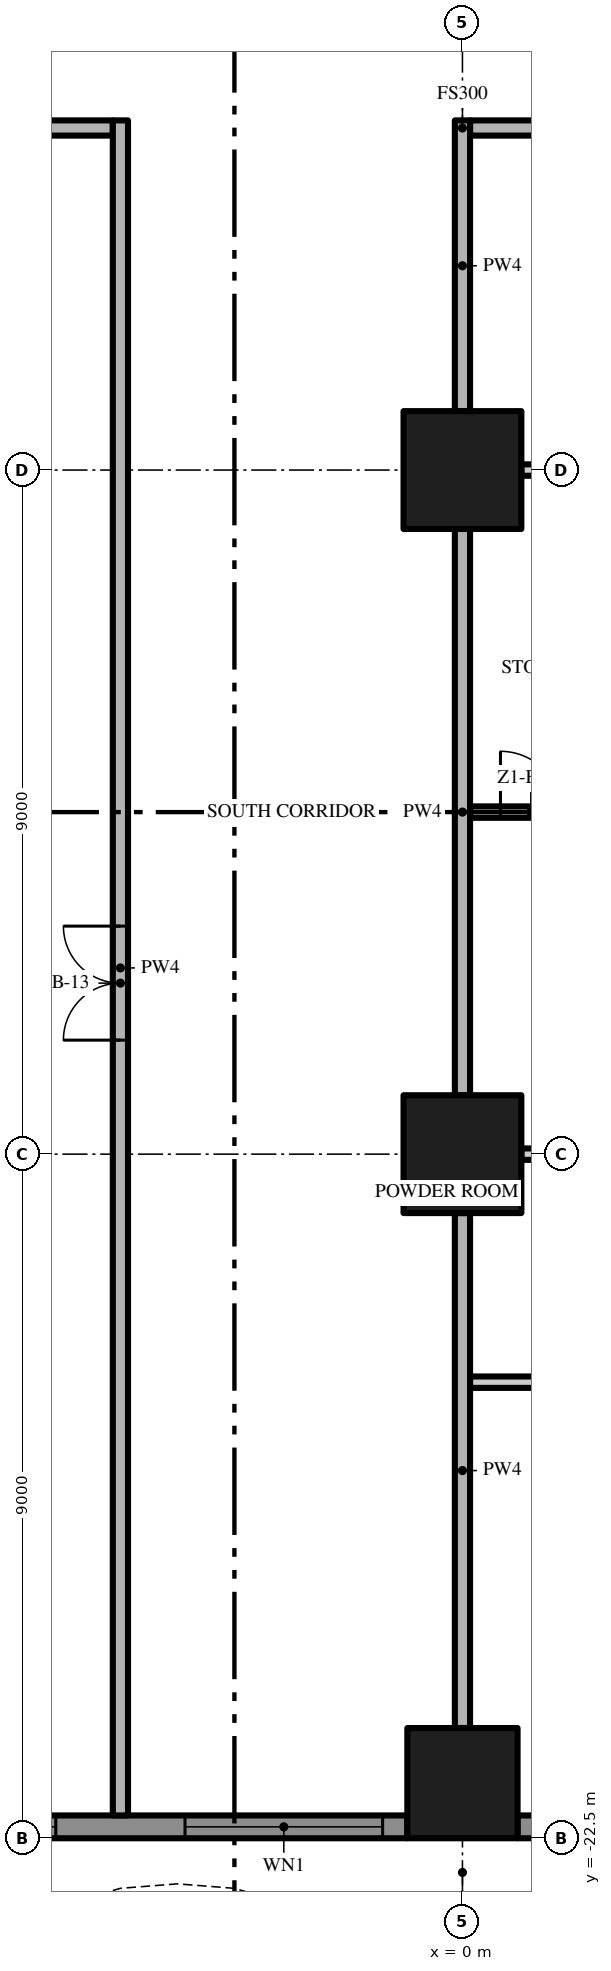
"""IFC4 building model, lengths in metres.
Left out: names, types, materials, properties, quantities, classifications, styles, units other than length and angle.
Written with IfcOpenShell. Run it as: python <this file> out.ifc"""

import sys

from ifc_helpers import new_model, si_unit, direction, frame, frame_2d, origin, origin_2d, place, context, subcontext, project, spatial, polyline, rectangle, outline, extrude, element, fill, save


model = new_model("IFC4")
c1 = context("Model", 3, precision=1e-05, world=origin(), true_north=direction((0.0, 1.0)))
c2 = subcontext(c1, "Body", "Model", "MODEL_VIEW")
j1 = project(units=[si_unit("LENGTHUNIT", "METRE"), si_unit("PLANEANGLEUNIT", "RADIAN")], contexts=[c1])
p1 = place(None, origin())
s1 = spatial("IfcSite", under=j1, at=p1, CompositionType="ELEMENT")
p2 = place(p1, origin())
s2 = spatial("IfcBuilding", under=s1, at=p2, CompositionType="ELEMENT")
p3 = place(p2, frame((0.0, 0.0, 30.2)))
s3 = spatial("IfcBuildingStorey", under=s2, at=p3, CompositionType="ELEMENT", Elevation=30.2)
p4 = place(p3, frame((0.0, -13.5, 0.0), z_axis=(0.0, 0.0, 1.0), x_axis=(1.0, 0.0, 0.0)))
e1 = element("IfcColumn", 1, at=p4, inside=s3, PredefinedType="COLUMN", context=c2, shape_type="SweptSolid", body=[
    extrude(rectangle(XDim=1.55, YDim=1.55, at=origin_2d()), origin(), (0.0, 0.0, 1.0), 3.5),
])
p5 = place(p3, frame((0.0, -21.775, 0.0), z_axis=(0.0, 0.0, 1.0), x_axis=(1.0, 0.0, 0.0)))
e2 = element("IfcColumn", 2, at=p5, inside=s3, PredefinedType="COLUMN", context=c2, shape_type="SweptSolid", body=[
    extrude(rectangle(XDim=1.45, YDim=1.45, at=origin_2d()), origin(), (0.0, 0.0, 1.0), 3.5),
])
p6 = place(p3, frame((0.0, -4.5, 0.0), z_axis=(0.0, 0.0, 1.0), x_axis=(1.0, 0.0, 0.0)))
e3 = element("IfcColumn", 3, at=p6, inside=s3, PredefinedType="COLUMN", context=c2, shape_type="SweptSolid", body=[
    extrude(rectangle(XDim=1.55, YDim=1.55, at=origin_2d()), origin(), (0.0, 0.0, 1.0), 3.5),
])
p7 = place(p3, frame((-0.725, -22.35, 0.0), z_axis=(0.0, 0.0, 1.0), x_axis=(-1.0, 0.0, 0.0)))
e4 = element("IfcWall", 4, at=p7, inside=s3, PredefinedType="SOLIDWALL", context=c2, shape_type="SweptSolid", body=[
    extrude(rectangle(XDim=7.55, YDim=0.3, at=frame_2d((3.775, 0.0))), origin(), (0.0, 0.0, 1.0), 3.5),
])
p8 = place(p7, frame((4.625, 0.0, 0.45)))
e5 = element("IfcOpeningElement", 5, at=p8, cuts=e4, PredefinedType="OPENING", context=c2, shape_type="SweptSolid", body=[
    extrude(rectangle(XDim=2.6, YDim=2.65, at=frame_2d((1.3, 1.325))), frame((0.0, 0.16, 0.0), z_axis=(0.0, -1.0, 0.0), x_axis=(1.0, 0.0, 0.0)), (0.0, 0.0, 1.0), 0.32),
])
p9 = place(p7, frame((0.325, 0.0, 0.45)))
e6 = element("IfcOpeningElement", 6, at=p9, cuts=e4, PredefinedType="OPENING", context=c2, shape_type="SweptSolid", body=[
    extrude(rectangle(XDim=2.6, YDim=2.65, at=frame_2d((1.3, 1.325))), frame((0.0, 0.16, 0.0), z_axis=(0.0, -1.0, 0.0), x_axis=(1.0, 0.0, 0.0)), (0.0, 0.0, 1.0), 0.32),
])
p10 = place(p3, frame((8.275, -22.35, 0.0), z_axis=(0.0, 0.0, 1.0), x_axis=(-1.0, 0.0, 0.0)))
e7 = element("IfcWall", 7, at=p10, inside=s3, PredefinedType="SOLIDWALL", context=c2, shape_type="SweptSolid", body=[
    extrude(rectangle(XDim=7.55, YDim=0.3, at=frame_2d((3.775, 0.0))), origin(), (0.0, 0.0, 1.0), 3.5),
])
p11 = place(p10, frame((4.625, 0.0, 0.0)))
e8 = element("IfcOpeningElement", 8, at=p11, cuts=e7, PredefinedType="OPENING", context=c2, shape_type="SweptSolid", body=[
    extrude(rectangle(XDim=2.6, YDim=2.4, at=frame_2d((1.3, 1.2))), frame((0.0, 0.16, 0.0), z_axis=(0.0, -1.0, 0.0), x_axis=(1.0, 0.0, 0.0)), (0.0, 0.0, 1.0), 0.32),
])
p12 = place(p10, frame((0.325, 0.0, 0.45)))
e9 = element("IfcOpeningElement", 9, at=p12, cuts=e7, PredefinedType="OPENING", context=c2, shape_type="SweptSolid", body=[
    extrude(rectangle(XDim=2.6, YDim=2.65, at=frame_2d((1.3, 1.325))), frame((0.0, 0.16, 0.0), z_axis=(0.0, -1.0, 0.0), x_axis=(1.0, 0.0, 0.0)), (0.0, 0.0, 1.0), 0.32),
])
p13 = place(p3, origin())
e10 = element("IfcWall", 10, at=p13, inside=s3, PredefinedType="USERDEFINED", context=c2, shape_type="SweptSolid", body=[
    extrude(outline(polyline([(-22.5, -24.3), (-21.0, -23.595), (-19.5, -23.159), (-18.75, -23.1), (-18.0, -23.159), (-16.5, -23.595), (-15.0, -24.3), (-13.5, -25.005), (-12.0, -25.441), (-11.25, -25.5), (-10.5, -25.441), (-9.0, -25.005), (-7.5, -24.3), (-6.0, -23.595), (-4.5, -23.159), (-3.75, -23.1), (-3.0, -23.159), (-1.5, -23.595), (0.0, -24.3), (1.5, -25.005), (3.0, -25.441), (3.75, -25.5), (4.5, -25.441), (6.0, -25.005), (7.5, -24.3), (9.0, -23.595), (10.5, -23.159), (11.25, -23.1), (12.0, -23.159), (13.5, -23.595), (15.0, -24.3), (16.5, -25.005), (18.0, -25.441), (18.75, -25.5), (19.5, -25.441), (21.0, -25.005), (22.5, -24.3), (22.394, -24.074), (20.911, -24.771), (19.455, -25.194), (18.75, -25.249), (18.045, -25.194), (16.589, -24.771), (15.106, -24.074), (13.589, -23.36), (12.045, -22.911), (11.25, -22.849), (10.455, -22.911), (8.911, -23.36), (7.394, -24.074), (5.911, -24.771), (4.455, -25.194), (3.75, -25.249), (3.045, -25.194), (1.589, -24.771), (0.106, -24.074), (-1.411, -23.36), (-2.955, -22.911), (-3.75, -22.849), (-4.545, -22.911), (-6.089, -23.36), (-7.606, -24.074), (-9.089, -24.771), (-10.545, -25.194), (-11.25, -25.249), (-11.955, -25.194), (-13.411, -24.771), (-14.894, -24.074), (-16.411, -23.36), (-17.955, -22.911), (-18.75, -22.849), (-19.545, -22.911), (-21.089, -23.36), (-22.606, -24.074), (-22.5, -24.3)])), origin(), (0.0, 0.0, 1.0), 0.9),
])
p14 = place(p3, frame((0.1, -16.5, 0.0), z_axis=(0.0, 0.0, 1.0), x_axis=(1.0, 0.0, 0.0)))
e11 = element("IfcWall", 11, at=p14, inside=s3, PredefinedType="PARTITIONING", context=c2, shape_type="SweptSolid", body=[
    extrude(rectangle(XDim=2.075, YDim=0.15, at=frame_2d((1.038, 0.0))), origin(), (0.0, 0.0, 1.0), 3.5),
])
p15 = place(p3, frame((8.225, -13.5, 0.0), z_axis=(0.0, 0.0, 1.0), x_axis=(-1.0, 0.0, 0.0)))
e12 = element("IfcWall", 12, at=p15, inside=s3, PredefinedType="PARTITIONING", context=c2, shape_type="SweptSolid", body=[
    extrude(rectangle(XDim=7.45, YDim=0.15, at=frame_2d((3.725, 0.0))), origin(), (0.0, 0.0, 1.0), 3.5),
])
p16 = place(p15, frame((1.725, 0.0, 0.0)))
e13 = element("IfcOpeningElement", 13, at=p16, cuts=e12, PredefinedType="OPENING", context=c2, shape_type="SweptSolid", body=[
    extrude(rectangle(XDim=1.8, YDim=2.4, at=frame_2d((0.9, 1.2))), frame((0.0, 0.085, 0.0), z_axis=(0.0, -1.0, 0.0), x_axis=(1.0, 0.0, 0.0)), (0.0, 0.0, 1.0), 0.17),
])
p17 = place(p3, frame((0.1, -9.0, 0.0), z_axis=(0.0, 0.0, 1.0), x_axis=(1.0, 0.0, 0.0)))
e14 = element("IfcWall", 14, at=p17, inside=s3, PredefinedType="PARTITIONING", context=c2, shape_type="SweptSolid", body=[
    extrude(rectangle(XDim=11.525, YDim=0.15, at=frame_2d((5.763, 0.0))), origin(), (0.0, 0.0, 1.0), 3.5),
])
p18 = place(p17, frame((0.4, 0.0, 0.0)))
e15 = element("IfcOpeningElement", 15, at=p18, cuts=e14, PredefinedType="OPENING", context=c2, shape_type="SweptSolid", body=[
    extrude(rectangle(XDim=0.8, YDim=2.0, at=frame_2d((0.4, 1.0))), frame((0.0, 0.085, 0.0), z_axis=(0.0, -1.0, 0.0), x_axis=(1.0, 0.0, 0.0)), (0.0, 0.0, 1.0), 0.17),
])
p19 = place(p17, frame((5.85, 0.0, 0.0)))
e16 = element("IfcOpeningElement", 16, at=p19, cuts=e14, PredefinedType="OPENING", context=c2, shape_type="SweptSolid", body=[
    extrude(rectangle(XDim=1.0, YDim=2.4, at=frame_2d((0.5, 1.2))), frame((0.0, 0.085, 0.0), z_axis=(0.0, -1.0, 0.0), x_axis=(1.0, 0.0, 0.0)), (0.0, 0.0, 1.0), 0.17),
])
p20 = place(p3, frame((8.225, -4.5, 0.0), z_axis=(0.0, 0.0, 1.0), x_axis=(-1.0, 0.0, 0.0)))
e17 = element("IfcWall", 17, at=p20, inside=s3, PredefinedType="PARTITIONING", context=c2, shape_type="SweptSolid", body=[
    extrude(rectangle(XDim=7.45, YDim=0.15, at=frame_2d((3.725, 0.0))), origin(), (0.0, 0.0, 1.0), 3.5),
])
p21 = place(p20, frame((5.225, 0.0, 0.0)))
e18 = element("IfcOpeningElement", 18, at=p21, cuts=e17, PredefinedType="OPENING", context=c2, shape_type="SweptSolid", body=[
    extrude(rectangle(XDim=0.8, YDim=2.0, at=frame_2d((0.4, 1.0))), frame((0.0, 0.085, 0.0), z_axis=(0.0, -1.0, 0.0), x_axis=(1.0, 0.0, 0.0)), (0.0, 0.0, 1.0), 0.17),
])
p22 = place(p3, frame((-17.4, 0.0, 0.0), z_axis=(0.0, 0.0, 1.0), x_axis=(1.0, 0.0, 0.0)))
e19 = element("IfcWall", 19, at=p22, inside=s3, PredefinedType="PARTITIONING", context=c2, shape_type="SweptSolid", body=[
    extrude(rectangle(XDim=12.8, YDim=0.2, at=frame_2d((6.4, 0.0))), origin(), (0.0, 0.0, 1.0), 3.5),
])
p23 = place(p3, frame((17.4, 0.0, 0.0), z_axis=(0.0, 0.0, 1.0), x_axis=(-1.0, 0.0, 0.0)))
e20 = element("IfcWall", 20, at=p23, inside=s3, PredefinedType="PARTITIONING", context=c2, shape_type="SweptSolid", body=[
    extrude(rectangle(XDim=17.3, YDim=0.2, at=frame_2d((8.65, 0.0))), origin(), (0.0, 0.0, 1.0), 3.5),
])
p24 = place(p23, frame((7.65, 0.0, 0.0)))
e21 = element("IfcOpeningElement", 21, at=p24, cuts=e20, PredefinedType="OPENING", context=c2, shape_type="SweptSolid", body=[
    extrude(rectangle(XDim=1.5, YDim=2.4, at=frame_2d((0.75, 1.2))), frame((0.0, 0.11, 0.0), z_axis=(0.0, -1.0, 0.0), x_axis=(1.0, 0.0, 0.0)), (0.0, 0.0, 1.0), 0.22),
])
p25 = place(p3, frame((-4.5, -22.2, 0.0), z_axis=(0.0, 0.0, 1.0), x_axis=(0.0, 1.0, 0.0)))
e22 = element("IfcWall", 22, at=p25, inside=s3, PredefinedType="PARTITIONING", context=c2, shape_type="SweptSolid", body=[
    extrude(rectangle(XDim=22.3, YDim=0.2, at=frame_2d((11.15, 0.0))), origin(), (0.0, 0.0, 1.0), 3.5),
])
p26 = place(p25, frame((10.2, 0.0, 0.0)))
e23 = element("IfcOpeningElement", 23, at=p26, cuts=e22, PredefinedType="OPENING", context=c2, shape_type="SweptSolid", body=[
    extrude(rectangle(XDim=1.5, YDim=2.4, at=frame_2d((0.75, 1.2))), frame((0.0, 0.11, 0.0), z_axis=(0.0, -1.0, 0.0), x_axis=(1.0, 0.0, 0.0)), (0.0, 0.0, 1.0), 0.22),
])
p27 = place(p3, frame((0.0, -21.05, 0.0), z_axis=(0.0, 0.0, 1.0), x_axis=(0.0, 1.0, 0.0)))
e24 = element("IfcWall", 24, at=p27, inside=s3, PredefinedType="PARTITIONING", context=c2, shape_type="SweptSolid", body=[
    extrude(rectangle(XDim=6.775, YDim=0.2, at=frame_2d((3.388, 0.0))), origin(), (0.0, 0.0, 1.0), 3.5),
])
p28 = place(p3, frame((0.0, -12.725, 0.0), z_axis=(0.0, 0.0, 1.0), x_axis=(0.0, 1.0, 0.0)))
e25 = element("IfcWall", 25, at=p28, inside=s3, PredefinedType="PARTITIONING", context=c2, shape_type="SweptSolid", body=[
    extrude(rectangle(XDim=7.45, YDim=0.2, at=frame_2d((3.725, 0.0))), origin(), (0.0, 0.0, 1.0), 3.5),
])
p29 = place(p3, frame((0.0, -3.725, 0.0), z_axis=(0.0, 0.0, 1.0), x_axis=(0.0, 1.0, 0.0)))
e26 = element("IfcWall", 26, at=p29, inside=s3, PredefinedType="PARTITIONING", context=c2, shape_type="SweptSolid", body=[
    extrude(rectangle(XDim=3.825, YDim=0.2, at=frame_2d((1.913, 0.0))), origin(), (0.0, 0.0, 1.0), 3.5),
])
p30 = place(p8, origin())
e27 = element("IfcWindow", 27, at=p30, inside=s3, PartitioningType="SINGLE_PANEL", PredefinedType="WINDOW", context=c2, shape_type="SweptSolid", body=[
    extrude(rectangle(XDim=2.6, YDim=2.65, at=frame_2d((1.3, 1.325))), frame((0.0, 0.03, 0.0), z_axis=(0.0, -1.0, 0.0), x_axis=(1.0, 0.0, 0.0)), (0.0, 0.0, 1.0), 0.06),
])
fill(e5, e27)
p31 = place(p9, origin())
e28 = element("IfcWindow", 28, at=p31, inside=s3, PartitioningType="SINGLE_PANEL", PredefinedType="WINDOW", context=c2, shape_type="SweptSolid", body=[
    extrude(rectangle(XDim=2.6, YDim=2.65, at=frame_2d((1.3, 1.325))), frame((0.0, 0.03, 0.0), z_axis=(0.0, -1.0, 0.0), x_axis=(1.0, 0.0, 0.0)), (0.0, 0.0, 1.0), 0.06),
])
fill(e6, e28)
p32 = place(p26, origin())
e29 = element("IfcDoor", 29, at=p32, inside=s3, OperationType="DOUBLE_DOOR_SINGLE_SWING", PredefinedType="DOOR", context=c2, shape_type="SweptSolid", body=[
    extrude(rectangle(XDim=1.5, YDim=2.4, at=frame_2d((0.75, 1.2))), frame((0.0, 0.025, 0.0), z_axis=(0.0, -1.0, 0.0), x_axis=(1.0, 0.0, 0.0)), (0.0, 0.0, 1.0), 0.05),
])
fill(e23, e29)
p33 = place(p18, origin())
e30 = element("IfcDoor", 30, at=p33, inside=s3, OperationType="SINGLE_SWING_LEFT", PredefinedType="DOOR", context=c2, shape_type="SweptSolid", body=[
    extrude(rectangle(XDim=0.8, YDim=2.0, at=frame_2d((0.4, 1.0))), frame((0.0, 0.025, 0.0), z_axis=(0.0, -1.0, 0.0), x_axis=(1.0, 0.0, 0.0)), (0.0, 0.0, 1.0), 0.05),
])
fill(e15, e30)
save(model, sys.argv[1])
